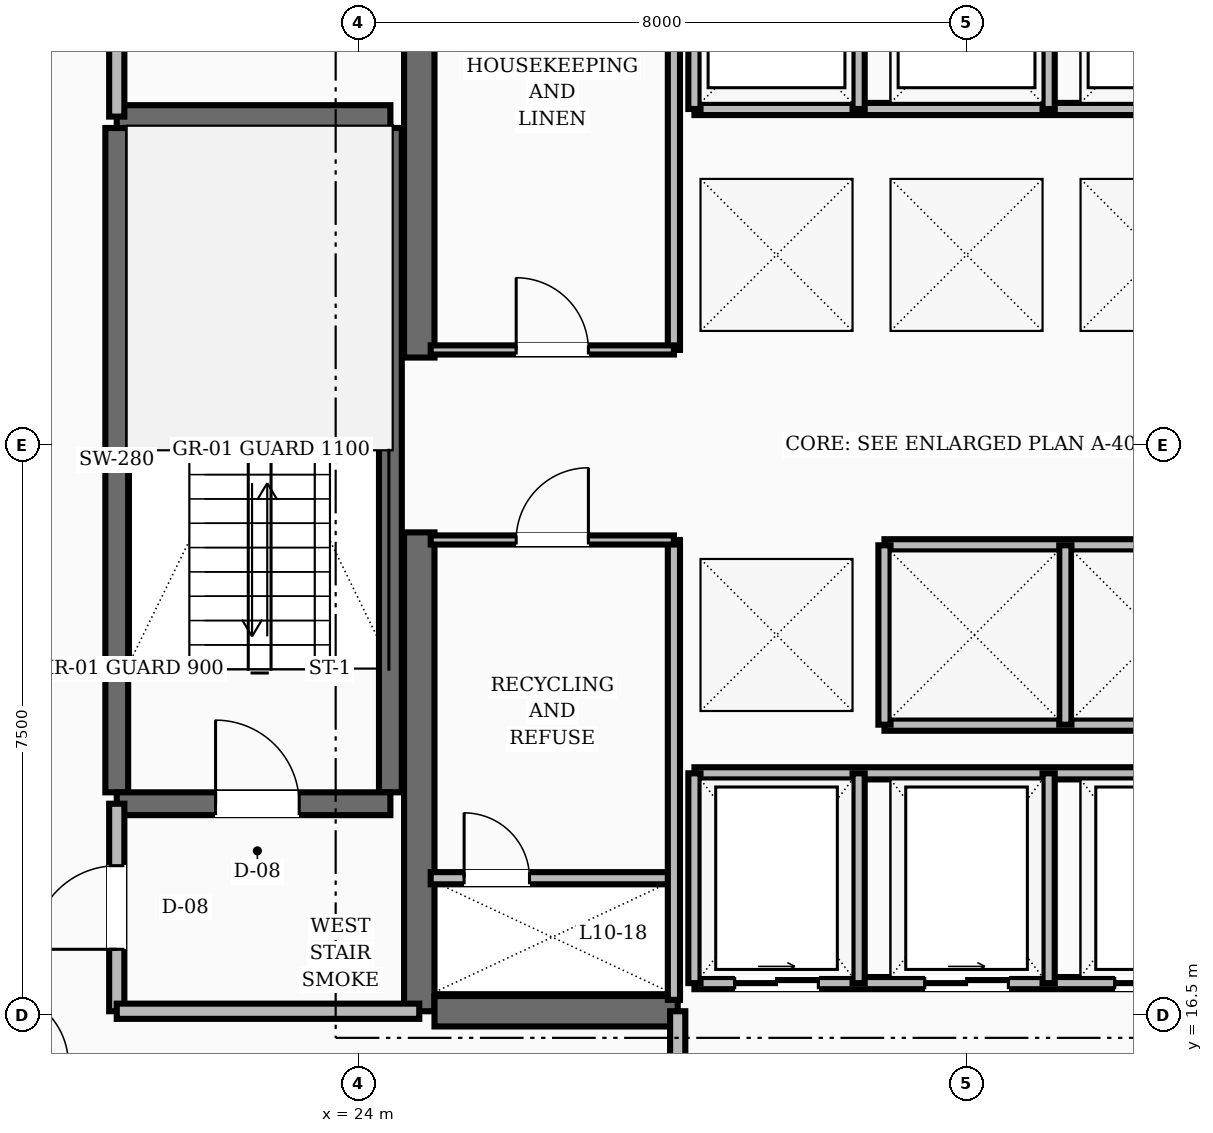
"""IFC4 building model, lengths in metres.
Left out: names, types, materials, properties, quantities, classifications, styles, units other than length and angle.
Written with IfcOpenShell. Run it as: python <this file> out.ifc"""

import sys

from ifc_helpers import new_model, si_unit, direction, frame, frame_2d, origin, place, context, subcontext, project, spatial, rectangle, extrude, element, fill, save


model = new_model("IFC4")
c1 = context("Model", 3, precision=1e-05, world=origin(), true_north=direction((0.0, 1.0)))
c2 = subcontext(c1, "Body", "Model", "MODEL_VIEW")
j1 = project(units=[si_unit("LENGTHUNIT", "METRE"), si_unit("PLANEANGLEUNIT", "RADIAN")], contexts=[c1])
p1 = place(None, origin())
s1 = spatial("IfcSite", under=j1, at=p1, CompositionType="ELEMENT")
p2 = place(p1, origin())
s2 = spatial("IfcBuilding", under=s1, at=p2, CompositionType="ELEMENT")
p3 = place(p2, frame((0.0, 0.0, 44.8)))
s3 = spatial("IfcBuildingStorey", under=s2, at=p3, CompositionType="ELEMENT", Elevation=44.8)
for number, where, z_axis, x_axis in (
    (1, (24.8, 16.55, 0.0), (0.0, 0.0, 1.0), (0.0, 1.0, 0.0)),
    (2, (24.8, 25.15, 0.0), (0.0, 0.0, 1.0), (0.0, 1.0, 0.0)),
):
    element("IfcWall", number, at=place(p3, frame(where, z_axis=z_axis, x_axis=x_axis)), inside=s3, PredefinedType="SHEAR", context=c2, shape_type="SweptSolid", body=[
        extrude(rectangle(XDim=6.3, YDim=0.4, at=frame_2d((3.15, 0.0))), origin(), (0.0, 0.0, 1.0), 3.6),
    ])
p4 = place(p3, frame((25.0, 16.55, 0.0), z_axis=(0.0, 0.0, 1.0), x_axis=(1.0, 0.0, 0.0)))
e3 = element("IfcWall", 3, at=p4, inside=s3, PredefinedType="SHEAR", context=c2, shape_type="SweptSolid", body=[
    extrude(rectangle(XDim=3.2, YDim=0.4, at=frame_2d((1.6, 0.0))), origin(), (0.0, 0.0, 1.0), 3.6),
])
for number, where, z_axis, x_axis in (
    (4, (20.82, 19.43, 0.0), (0.0, 0.0, 1.0), (0.0, 1.0, 0.0)),
    (5, (24.42, 19.43, 0.0), (0.0, 0.0, 1.0), (0.0, 1.0, 0.0)),
):
    element("IfcWall", number, at=place(p3, frame(where, z_axis=z_axis, x_axis=x_axis)), inside=s3, PredefinedType="SHEAR", context=c2, shape_type="SweptSolid", body=[
        extrude(rectangle(XDim=8.74, YDim=0.3, at=frame_2d((4.37, 0.0))), origin(), (0.0, 0.0, 1.0), 3.6),
    ])
p5 = place(p3, frame((20.82, 19.28, 0.0), z_axis=(0.0, 0.0, 1.0), x_axis=(1.0, 0.0, 0.0)))
e6 = element("IfcWall", 6, at=p5, inside=s3, PredefinedType="SHEAR", context=c2, shape_type="SweptSolid", body=[
    extrude(rectangle(XDim=3.6, YDim=0.3, at=frame_2d((1.8, 0.0))), origin(), (0.0, 0.0, 1.0), 3.6),
])
p6 = place(p5, frame((1.3, 0.0, 0.0)))
e7 = element("IfcOpeningElement", 7, at=p6, cuts=e6, PredefinedType="OPENING", context=c2, shape_type="SweptSolid", body=[
    extrude(rectangle(XDim=1.1, YDim=2.1, at=frame_2d((0.55, 1.05))), frame((0.0, 0.16, 0.0), z_axis=(0.0, -1.0, 0.0), x_axis=(1.0, 0.0, 0.0)), (0.0, 0.0, 1.0), 0.32),
])
p7 = place(p3, frame((20.82, 28.32, 0.0), z_axis=(0.0, 0.0, 1.0), x_axis=(1.0, 0.0, 0.0)))
e8 = element("IfcWall", 8, at=p7, inside=s3, PredefinedType="SHEAR", context=c2, shape_type="SweptSolid", body=[
    extrude(rectangle(XDim=3.6, YDim=0.3, at=frame_2d((1.8, 0.0))), origin(), (0.0, 0.0, 1.0), 3.6),
])
p8 = place(p3, frame((20.82, 16.55, 0.0), z_axis=(0.0, 0.0, 1.0), x_axis=(0.0, 1.0, 0.0)))
e9 = element("IfcWall", 9, at=p8, inside=s3, PredefinedType="SOLIDWALL", context=c2, shape_type="SweptSolid", body=[
    extrude(rectangle(XDim=2.73, YDim=0.2, at=frame_2d((1.365, 0.0))), origin(), (0.0, 0.0, 1.0), 2.61),
])
p9 = place(p8, frame((0.815, 0.0, 0.0)))
e10 = element("IfcOpeningElement", 10, at=p9, cuts=e9, PredefinedType="OPENING", context=c2, shape_type="SweptSolid", body=[
    extrude(rectangle(XDim=1.1, YDim=2.1, at=frame_2d((0.55, 1.05))), frame((0.0, 0.11, 0.0), z_axis=(0.0, -1.0, 0.0), x_axis=(1.0, 0.0, 0.0)), (0.0, 0.0, 1.0), 0.22),
])
p10 = place(p3, frame((20.82, 16.55, 0.0), z_axis=(0.0, 0.0, 1.0), x_axis=(1.0, 0.0, 0.0)))
e11 = element("IfcWall", 11, at=p10, inside=s3, PredefinedType="SOLIDWALL", context=c2, shape_type="SweptSolid", body=[
    extrude(rectangle(XDim=3.98, YDim=0.2, at=frame_2d((1.99, 0.0))), origin(), (0.0, 0.0, 1.0), 2.61),
])
p11 = place(p3, frame((20.82, 28.32, 0.0), z_axis=(0.0, 0.0, 1.0), x_axis=(0.0, 1.0, 0.0)))
e12 = element("IfcWall", 12, at=p11, inside=s3, PredefinedType="SOLIDWALL", context=c2, shape_type="SweptSolid", body=[
    extrude(rectangle(XDim=3.13, YDim=0.2, at=frame_2d((1.565, 0.0))), origin(), (0.0, 0.0, 1.0), 2.61),
])
p12 = place(p11, frame((1.09, 0.0, 0.0)))
e13 = element("IfcOpeningElement", 13, at=p12, cuts=e12, PredefinedType="OPENING", context=c2, shape_type="SweptSolid", body=[
    extrude(rectangle(XDim=0.95, YDim=2.1, at=frame_2d((0.475, 1.05))), frame((0.0, 0.11, 0.0), z_axis=(0.0, -1.0, 0.0), x_axis=(1.0, 0.0, 0.0)), (0.0, 0.0, 1.0), 0.22),
])
p13 = place(p3, frame((28.2, 14.35, 0.0), z_axis=(0.0, 0.0, 1.0), x_axis=(0.0, 1.0, 0.0)))
e14 = element("IfcWall", 14, at=p13, inside=s3, PredefinedType="SOLIDWALL", context=c2, shape_type="SweptSolid", body=[
    extrude(rectangle(XDim=2.2, YDim=0.2, at=frame_2d((1.1, 0.0))), origin(), (0.0, 0.0, 1.0), 2.61),
])
p14 = place(p3, frame((28.42, 28.42, 0.0), z_axis=(0.0, 0.0, 1.0), x_axis=(1.0, 0.0, 0.0)))
e15 = element("IfcWall", 15, at=p14, inside=s3, PredefinedType="SOLIDWALL", context=c2, shape_type="SweptSolid", body=[
    extrude(rectangle(XDim=7.16, YDim=0.16, at=frame_2d((3.58, 0.0))), origin(), (0.0, 0.0, 1.0), 2.61),
])
for number, where, z_axis, x_axis in (
    (16, (28.42, 28.42, 0.0), (0.0, 0.0, 1.0), (0.0, 1.0, 0.0)),
    (17, (30.58, 28.42, 0.0), (0.0, 0.0, 1.0), (0.0, 1.0, 0.0)),
    (18, (33.08, 28.42, 0.0), (0.0, 0.0, 1.0), (0.0, 1.0, 0.0)),
):
    element("IfcWall", number, at=place(p3, frame(where, z_axis=z_axis, x_axis=x_axis)), inside=s3, PredefinedType="SOLIDWALL", context=c2, shape_type="SweptSolid", body=[
        extrude(rectangle(XDim=2.16, YDim=0.16, at=frame_2d((1.08, 0.0))), origin(), (0.0, 0.0, 1.0), 2.61),
    ])
for number, where, z_axis, x_axis in (
    (19, (30.92, 22.68, 0.0), (0.0, 0.0, 1.0), (1.0, 0.0, 0.0)),
    (20, (30.92, 20.32, 0.0), (0.0, 0.0, 1.0), (1.0, 0.0, 0.0)),
):
    element("IfcWall", number, at=place(p3, frame(where, z_axis=z_axis, x_axis=x_axis)), inside=s3, PredefinedType="SOLIDWALL", context=c2, shape_type="SweptSolid", body=[
        extrude(rectangle(XDim=4.76, YDim=0.16, at=frame_2d((2.38, 0.0))), origin(), (0.0, 0.0, 1.0), 2.61),
    ])
for number, where, z_axis, x_axis in (
    (21, (30.92, 20.32, 0.0), (0.0, 0.0, 1.0), (0.0, 1.0, 0.0)),
    (22, (33.3, 20.32, 0.0), (0.0, 0.0, 1.0), (0.0, 1.0, 0.0)),
):
    element("IfcWall", number, at=place(p3, frame(where, z_axis=z_axis, x_axis=x_axis)), inside=s3, PredefinedType="SOLIDWALL", context=c2, shape_type="SweptSolid", body=[
        extrude(rectangle(XDim=2.36, YDim=0.16, at=frame_2d((1.18, 0.0))), origin(), (0.0, 0.0, 1.0), 2.61),
    ])
p15 = place(p3, frame((28.42, 16.92, 0.0), z_axis=(0.0, 0.0, 1.0), x_axis=(1.0, 0.0, 0.0)))
e23 = element("IfcWall", 23, at=p15, inside=s3, PredefinedType="SOLIDWALL", context=c2, shape_type="SweptSolid", body=[
    extrude(rectangle(XDim=7.16, YDim=0.16, at=frame_2d((3.58, 0.0))), origin(), (0.0, 0.0, 1.0), 2.61),
])
p16 = place(p15, frame((0.53, 0.0, 0.0)))
e24 = element("IfcOpeningElement", 24, at=p16, cuts=e23, PredefinedType="OPENING", context=c2, shape_type="SweptSolid", body=[
    extrude(rectangle(XDim=1.1, YDim=2.15, at=frame_2d((0.55, 1.075))), frame((0.0, 0.09, 0.0), z_axis=(0.0, -1.0, 0.0), x_axis=(1.0, 0.0, 0.0)), (0.0, 0.0, 1.0), 0.18),
])
p17 = place(p15, frame((3.03, 0.0, 0.0)))
e25 = element("IfcOpeningElement", 25, at=p17, cuts=e23, PredefinedType="OPENING", context=c2, shape_type="SweptSolid", body=[
    extrude(rectangle(XDim=1.1, YDim=2.15, at=frame_2d((0.55, 1.075))), frame((0.0, 0.09, 0.0), z_axis=(0.0, -1.0, 0.0), x_axis=(1.0, 0.0, 0.0)), (0.0, 0.0, 1.0), 0.18),
])
p18 = place(p15, frame((5.53, 0.0, 0.0)))
e26 = element("IfcOpeningElement", 26, at=p18, cuts=e23, PredefinedType="OPENING", context=c2, shape_type="SweptSolid", body=[
    extrude(rectangle(XDim=1.1, YDim=2.15, at=frame_2d((0.55, 1.075))), frame((0.0, 0.09, 0.0), z_axis=(0.0, -1.0, 0.0), x_axis=(1.0, 0.0, 0.0)), (0.0, 0.0, 1.0), 0.18),
])
p19 = place(p3, frame((28.42, 19.68, 0.0), z_axis=(0.0, 0.0, 1.0), x_axis=(1.0, 0.0, 0.0)))
e27 = element("IfcWall", 27, at=p19, inside=s3, PredefinedType="SOLIDWALL", context=c2, shape_type="SweptSolid", body=[
    extrude(rectangle(XDim=7.16, YDim=0.16, at=frame_2d((3.58, 0.0))), origin(), (0.0, 0.0, 1.0), 2.61),
])
for number, where, z_axis, x_axis in (
    (28, (28.42, 16.92, 0.0), (0.0, 0.0, 1.0), (0.0, 1.0, 0.0)),
    (29, (30.58, 16.92, 0.0), (0.0, 0.0, 1.0), (0.0, 1.0, 0.0)),
    (30, (33.08, 16.92, 0.0), (0.0, 0.0, 1.0), (0.0, 1.0, 0.0)),
):
    element("IfcWall", number, at=place(p3, frame(where, z_axis=z_axis, x_axis=x_axis)), inside=s3, PredefinedType="SOLIDWALL", context=c2, shape_type="SweptSolid", body=[
        extrude(rectangle(XDim=2.76, YDim=0.16, at=frame_2d((1.38, 0.0))), origin(), (0.0, 0.0, 1.0), 2.61),
    ])
p20 = place(p3, frame((24.95, 18.3, 0.0), z_axis=(0.0, 0.0, 1.0), x_axis=(1.0, 0.0, 0.0)))
e31 = element("IfcWall", 31, at=p20, inside=s3, PredefinedType="SOLIDWALL", context=c2, shape_type="SweptSolid", body=[
    extrude(rectangle(XDim=3.2, YDim=0.16, at=frame_2d((1.6, 0.0))), origin(), (0.0, 0.0, 1.0), 2.61),
])
p21 = place(p20, frame((0.44, 0.0, 0.0)))
e32 = element("IfcOpeningElement", 32, at=p21, cuts=e31, PredefinedType="OPENING", context=c2, shape_type="SweptSolid", body=[
    extrude(rectangle(XDim=0.86, YDim=2.05, at=frame_2d((0.43, 1.025))), frame((0.0, 0.09, 0.0), z_axis=(0.0, -1.0, 0.0), x_axis=(1.0, 0.0, 0.0)), (0.0, 0.0, 1.0), 0.18),
])
p22 = place(p3, frame((28.15, 16.7, 0.0), z_axis=(0.0, 0.0, 1.0), x_axis=(0.0, 1.0, 0.0)))
e33 = element("IfcWall", 33, at=p22, inside=s3, PredefinedType="SOLIDWALL", context=c2, shape_type="SweptSolid", body=[
    extrude(rectangle(XDim=6.05, YDim=0.16, at=frame_2d((3.025, 0.0))), origin(), (0.0, 0.0, 1.0), 2.61),
])
p23 = place(p3, frame((28.15, 25.25, 0.0), z_axis=(0.0, 0.0, 1.0), x_axis=(0.0, 1.0, 0.0)))
e34 = element("IfcWall", 34, at=p23, inside=s3, PredefinedType="SOLIDWALL", context=c2, shape_type="SweptSolid", body=[
    extrude(rectangle(XDim=6.1, YDim=0.16, at=frame_2d((3.05, 0.0))), origin(), (0.0, 0.0, 1.0), 2.61),
])
p24 = place(p3, frame((24.95, 25.25, 0.0), z_axis=(0.0, 0.0, 1.0), x_axis=(1.0, 0.0, 0.0)))
e35 = element("IfcWall", 35, at=p24, inside=s3, PredefinedType="PARTITIONING", context=c2, shape_type="SweptSolid", body=[
    extrude(rectangle(XDim=3.2, YDim=0.12, at=frame_2d((1.6, 0.0))), origin(), (0.0, 0.0, 1.0), 2.61),
])
p25 = place(p24, frame((1.125, 0.0, 0.0)))
e36 = element("IfcOpeningElement", 36, at=p25, cuts=e35, PredefinedType="OPENING", context=c2, shape_type="SweptSolid", body=[
    extrude(rectangle(XDim=0.95, YDim=2.1, at=frame_2d((0.475, 1.05))), frame((0.0, 0.07, 0.0), z_axis=(0.0, -1.0, 0.0), x_axis=(1.0, 0.0, 0.0)), (0.0, 0.0, 1.0), 0.14),
])
p26 = place(p3, frame((24.95, 22.75, 0.0), z_axis=(0.0, 0.0, 1.0), x_axis=(1.0, 0.0, 0.0)))
e37 = element("IfcWall", 37, at=p26, inside=s3, PredefinedType="PARTITIONING", context=c2, shape_type="SweptSolid", body=[
    extrude(rectangle(XDim=3.2, YDim=0.12, at=frame_2d((1.6, 0.0))), origin(), (0.0, 0.0, 1.0), 2.61),
])
p27 = place(p26, frame((1.125, 0.0, 0.0)))
e38 = element("IfcOpeningElement", 38, at=p27, cuts=e37, PredefinedType="OPENING", context=c2, shape_type="SweptSolid", body=[
    extrude(rectangle(XDim=0.95, YDim=2.1, at=frame_2d((0.475, 1.05))), frame((0.0, 0.07, 0.0), z_axis=(0.0, -1.0, 0.0), x_axis=(1.0, 0.0, 0.0)), (0.0, 0.0, 1.0), 0.14),
])
p28 = place(p3, frame((18.562, 16.537, 0.0), z_axis=(0.0, 0.0, 1.0), x_axis=(0.702569520063, -0.711615113301, 0.0)))
e39 = element("IfcWall", 39, at=p28, inside=s3, PredefinedType="SOLIDWALL", context=c2, shape_type="SweptSolid", body=[
    extrude(rectangle(XDim=2.861, YDim=0.16, at=frame_2d((1.43, 0.0))), origin(), (0.0, 0.0, 1.0), 2.61),
])
p29 = place(p28, frame((0.955, 0.0, 0.0)))
e40 = element("IfcOpeningElement", 40, at=p29, cuts=e39, PredefinedType="OPENING", context=c2, shape_type="SweptSolid", body=[
    extrude(rectangle(XDim=0.95, YDim=2.1, at=frame_2d((0.475, 1.05))), frame((0.0, 0.09, 0.0), z_axis=(0.0, -1.0, 0.0), x_axis=(1.0, 0.0, 0.0)), (0.0, 0.0, 1.0), 0.18),
])
p30 = place(p6, origin())
e41 = element("IfcDoor", 41, at=p30, inside=s3, OperationType="SINGLE_SWING_LEFT", PredefinedType="DOOR", context=c2, shape_type="SweptSolid", body=[
    extrude(rectangle(XDim=1.1, YDim=2.1, at=frame_2d((0.55, 1.05))), frame((0.0, 0.025, 0.0), z_axis=(0.0, -1.0, 0.0), x_axis=(1.0, 0.0, 0.0)), (0.0, 0.0, 1.0), 0.05),
])
fill(e7, e41)
p31 = place(p9, origin())
e42 = element("IfcDoor", 42, at=p31, inside=s3, OperationType="SINGLE_SWING_LEFT", PredefinedType="DOOR", context=c2, shape_type="SweptSolid", body=[
    extrude(rectangle(XDim=1.1, YDim=2.1, at=frame_2d((0.55, 1.05))), frame((0.0, 0.025, 0.0), z_axis=(0.0, -1.0, 0.0), x_axis=(1.0, 0.0, 0.0)), (0.0, 0.0, 1.0), 0.05),
])
fill(e10, e42)
p32 = place(p16, origin())
e43 = element("IfcDoor", 43, at=p32, inside=s3, OperationType="SLIDING_TO_RIGHT", PredefinedType="DOOR", context=c2, shape_type="SweptSolid", body=[
    extrude(rectangle(XDim=1.1, YDim=2.15, at=frame_2d((0.55, 1.075))), frame((0.0, 0.025, 0.0), z_axis=(0.0, -1.0, 0.0), x_axis=(1.0, 0.0, 0.0)), (0.0, 0.0, 1.0), 0.05),
])
fill(e24, e43)
p33 = place(p17, origin())
e44 = element("IfcDoor", 44, at=p33, inside=s3, OperationType="SLIDING_TO_RIGHT", PredefinedType="DOOR", context=c2, shape_type="SweptSolid", body=[
    extrude(rectangle(XDim=1.1, YDim=2.15, at=frame_2d((0.55, 1.075))), frame((0.0, 0.025, 0.0), z_axis=(0.0, -1.0, 0.0), x_axis=(1.0, 0.0, 0.0)), (0.0, 0.0, 1.0), 0.05),
])
fill(e25, e44)
p34 = place(p18, origin())
e45 = element("IfcDoor", 45, at=p34, inside=s3, OperationType="SLIDING_TO_RIGHT", PredefinedType="DOOR", context=c2, shape_type="SweptSolid", body=[
    extrude(rectangle(XDim=1.1, YDim=2.15, at=frame_2d((0.55, 1.075))), frame((0.0, 0.025, 0.0), z_axis=(0.0, -1.0, 0.0), x_axis=(1.0, 0.0, 0.0)), (0.0, 0.0, 1.0), 0.05),
])
fill(e26, e45)
p35 = place(p21, origin())
e46 = element("IfcDoor", 46, at=p35, inside=s3, OperationType="SINGLE_SWING_LEFT", PredefinedType="TRAPDOOR", context=c2, shape_type="SweptSolid", body=[
    extrude(rectangle(XDim=0.86, YDim=2.05, at=frame_2d((0.43, 1.025))), frame((0.0, 0.025, 0.0), z_axis=(0.0, -1.0, 0.0), x_axis=(1.0, 0.0, 0.0)), (0.0, 0.0, 1.0), 0.05),
])
fill(e32, e46)
p36 = place(p25, origin())
e47 = element("IfcDoor", 47, at=p36, inside=s3, OperationType="SINGLE_SWING_LEFT", PredefinedType="DOOR", context=c2, shape_type="SweptSolid", body=[
    extrude(rectangle(XDim=0.95, YDim=2.1, at=frame_2d((0.475, 1.05))), frame((0.0, 0.025, 0.0), z_axis=(0.0, -1.0, 0.0), x_axis=(1.0, 0.0, 0.0)), (0.0, 0.0, 1.0), 0.05),
])
fill(e36, e47)
p37 = place(p27, origin())
e48 = element("IfcDoor", 48, at=p37, inside=s3, OperationType="SINGLE_SWING_RIGHT", PredefinedType="DOOR", context=c2, shape_type="SweptSolid", body=[
    extrude(rectangle(XDim=0.95, YDim=2.1, at=frame_2d((0.475, 1.05))), frame((0.0, 0.025, 0.0), z_axis=(0.0, -1.0, 0.0), x_axis=(1.0, 0.0, 0.0)), (0.0, 0.0, 1.0), 0.05),
])
fill(e38, e48)
save(model, sys.argv[1])
